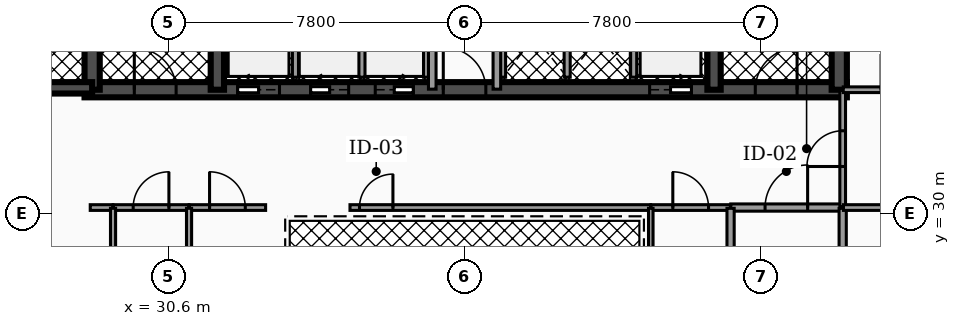
"""IFC4 building model, lengths in metres.
Left out: names, types, materials, properties, quantities, classifications, styles, units other than length and angle.
Written with IfcOpenShell. Run it as: python <this file> out.ifc"""

import sys

from ifc_helpers import new_model, si_unit, direction, frame, frame_2d, origin, place, context, subcontext, project, spatial, rectangle, extrude, element, fill, save


model = new_model("IFC4")
c1 = context("Model", 3, precision=1e-05, world=origin(), true_north=direction((0.0, 1.0)))
c2 = subcontext(c1, "Body", "Model", "MODEL_VIEW")
j1 = project(units=[si_unit("LENGTHUNIT", "METRE"), si_unit("PLANEANGLEUNIT", "RADIAN")], contexts=[c1])
p1 = place(None, origin())
s1 = spatial("IfcSite", under=j1, at=p1, CompositionType="ELEMENT")
p2 = place(p1, origin())
s2 = spatial("IfcBuilding", under=s1, at=p2, CompositionType="ELEMENT")
p3 = place(p2, frame((0.0, 0.0, 138.38)))
s3 = spatial("IfcBuildingStorey", under=s2, at=p3, CompositionType="ELEMENT", Elevation=138.38)
p4 = place(p3, frame((28.4, 33.25, 0.0), z_axis=(0.0, 0.0, 1.0), x_axis=(1.0, 0.0, 0.0)))
e1 = element("IfcWall", 1, at=p4, inside=s3, PredefinedType="SHEAR", context=c2, shape_type="SweptSolid", body=[
    extrude(rectangle(XDim=20.06, YDim=0.4, at=frame_2d((10.03, 0.0))), origin(), (0.0, 0.0, 1.0), 3.5),
])
p5 = place(p4, frame((4.03, 0.0, 0.0)))
e2 = element("IfcOpeningElement", 2, at=p5, cuts=e1, PredefinedType="OPENING", context=c2, shape_type="SweptSolid", body=[
    extrude(rectangle(XDim=1.1, YDim=2.15, at=frame_2d((0.55, 1.075))), frame((0.0, 0.21, 0.0), z_axis=(0.0, -1.0, 0.0), x_axis=(1.0, 0.0, 0.0)), (0.0, 0.0, 1.0), 0.42),
])
p6 = place(p4, frame((14.87, 0.0, 0.0)))
e3 = element("IfcOpeningElement", 3, at=p6, cuts=e1, PredefinedType="OPENING", context=c2, shape_type="SweptSolid", body=[
    extrude(rectangle(XDim=1.1, YDim=2.15, at=frame_2d((0.55, 1.075))), frame((0.0, 0.21, 0.0), z_axis=(0.0, -1.0, 0.0), x_axis=(1.0, 0.0, 0.0)), (0.0, 0.0, 1.0), 0.42),
])
p7 = place(p4, frame((5.95, 0.0, 0.0)))
e4 = element("IfcOpeningElement", 4, at=p7, cuts=e1, PredefinedType="OPENING", context=c2, shape_type="SweptSolid", body=[
    extrude(rectangle(XDim=1.0, YDim=2.1, at=frame_2d((0.5, 1.05))), frame((0.0, 0.21, 0.0), z_axis=(0.0, -1.0, 0.0), x_axis=(1.0, 0.0, 0.0)), (0.0, 0.0, 1.0), 0.42),
])
p8 = place(p4, frame((7.65, 0.0, 0.0)))
e5 = element("IfcOpeningElement", 5, at=p8, cuts=e1, PredefinedType="OPENING", context=c2, shape_type="SweptSolid", body=[
    extrude(rectangle(XDim=1.0, YDim=2.1, at=frame_2d((0.5, 1.05))), frame((0.0, 0.21, 0.0), z_axis=(0.0, -1.0, 0.0), x_axis=(1.0, 0.0, 0.0)), (0.0, 0.0, 1.0), 0.42),
])
p9 = place(p4, frame((1.31, 0.0, 0.0)))
e6 = element("IfcOpeningElement", 6, at=p9, cuts=e1, PredefinedType="OPENING", context=c2, shape_type="SweptSolid", body=[
    extrude(rectangle(XDim=1.1, YDim=2.2, at=frame_2d((0.55, 1.1))), frame((0.0, 0.21, 0.0), z_axis=(0.0, -1.0, 0.0), x_axis=(1.0, 0.0, 0.0)), (0.0, 0.0, 1.0), 0.42),
])
p10 = place(p4, frame((9.44, 0.0, 0.0)))
e7 = element("IfcOpeningElement", 7, at=p10, cuts=e1, PredefinedType="OPENING", context=c2, shape_type="SweptSolid", body=[
    extrude(rectangle(XDim=1.12, YDim=2.05, at=frame_2d((0.56, 1.025))), frame((0.0, 0.21, 0.0), z_axis=(0.0, -1.0, 0.0), x_axis=(1.0, 0.0, 0.0)), (0.0, 0.0, 1.0), 0.42),
])
p11 = place(p4, frame((17.65, 0.0, 0.0)))
e8 = element("IfcOpeningElement", 8, at=p11, cuts=e1, PredefinedType="OPENING", context=c2, shape_type="SweptSolid", body=[
    extrude(rectangle(XDim=1.1, YDim=2.2, at=frame_2d((0.55, 1.1))), frame((0.0, 0.21, 0.0), z_axis=(0.0, -1.0, 0.0), x_axis=(1.0, 0.0, 0.0)), (0.0, 0.0, 1.0), 0.42),
])
p12 = place(p3, frame((28.6, 33.25, 0.0), z_axis=(0.0, 0.0, 1.0), x_axis=(0.0, 1.0, 0.0)))
e9 = element("IfcWall", 9, at=p12, inside=s3, PredefinedType="SHEAR", context=c2, shape_type="SweptSolid", body=[
    extrude(rectangle(XDim=10.2, YDim=0.4, at=frame_2d((5.1, 0.0))), origin(), (0.0, 0.0, 1.0), 3.5),
])
for number, where, z_axis, x_axis in (
    (10, (31.895, 33.25, 0.0), (0.0, 0.0, 1.0), (0.0, 1.0, 0.0)),
    (11, (44.965, 33.25, 0.0), (0.0, 0.0, 1.0), (0.0, 1.0, 0.0)),
):
    element("IfcWall", number, at=place(p3, frame(where, z_axis=z_axis, x_axis=x_axis)), inside=s3, PredefinedType="SHEAR", context=c2, shape_type="SweptSolid", body=[
        extrude(rectangle(XDim=10.2, YDim=0.35, at=frame_2d((5.1, 0.0))), origin(), (0.0, 0.0, 1.0), 3.5),
    ])
p13 = place(p3, frame((48.26, 33.25, 0.0), z_axis=(0.0, 0.0, 1.0), x_axis=(0.0, 1.0, 0.0)))
e12 = element("IfcWall", 12, at=p13, inside=s3, PredefinedType="SHEAR", context=c2, shape_type="SweptSolid", body=[
    extrude(rectangle(XDim=10.2, YDim=0.4, at=frame_2d((5.1, 0.0))), origin(), (0.0, 0.0, 1.0), 3.5),
])
p14 = place(p3, frame((25.08, 33.3, 0.0), z_axis=(0.0, 0.0, 1.0), x_axis=(1.0, 0.0, 0.0)))
e13 = element("IfcWall", 13, at=p14, inside=s3, PredefinedType="SHEAR", context=c2, shape_type="SweptSolid", body=[
    extrude(rectangle(XDim=3.52, YDim=0.3, at=frame_2d((1.76, 0.0))), origin(), (0.0, 0.0, 1.0), 3.5),
])
p15 = place(p14, frame((1.335, 0.0, 0.0)))
e14 = element("IfcOpeningElement", 14, at=p15, cuts=e13, PredefinedType="OPENING", context=c2, shape_type="SweptSolid", body=[
    extrude(rectangle(XDim=0.95, YDim=2.2, at=frame_2d((0.475, 1.1))), frame((0.0, 0.16, 0.0), z_axis=(0.0, -1.0, 0.0), x_axis=(1.0, 0.0, 0.0)), (0.0, 0.0, 1.0), 0.32),
])
for number, where, z_axis, x_axis in (
    (15, (33.95, 33.58, 0.0), (0.0, 0.0, 1.0), (0.0, 1.0, 0.0)),
    (16, (42.85, 33.58, 0.0), (0.0, 0.0, 1.0), (0.0, 1.0, 0.0)),
):
    element("IfcWall", number, at=place(p3, frame(where, z_axis=z_axis, x_axis=x_axis)), inside=s3, PredefinedType="SOLIDWALL", context=c2, shape_type="SweptSolid", body=[
        extrude(rectangle(XDim=2.45, YDim=0.16, at=frame_2d((1.225, 0.0))), origin(), (0.0, 0.0, 1.0), 2.472),
    ])
for number, where, z_axis, x_axis in (
    (17, (35.7, 33.58, 0.0), (0.0, 0.0, 1.0), (0.0, 1.0, 0.0)),
    (18, (37.4, 33.58, 0.0), (0.0, 0.0, 1.0), (0.0, 1.0, 0.0)),
    (19, (39.4, 33.58, 0.0), (0.0, 0.0, 1.0), (0.0, 1.0, 0.0)),
    (20, (41.1, 33.58, 0.0), (0.0, 0.0, 1.0), (0.0, 1.0, 0.0)),
):
    element("IfcWall", number, at=place(p3, frame(where, z_axis=z_axis, x_axis=x_axis)), inside=s3, PredefinedType="SOLIDWALL", context=c2, shape_type="SweptSolid", body=[
        extrude(rectangle(XDim=2.25, YDim=0.16, at=frame_2d((1.125, 0.0))), origin(), (0.0, 0.0, 1.0), 2.472),
    ])
p16 = place(p3, frame((37.55, 33.265, 0.0), z_axis=(0.0, 0.0, 1.0), x_axis=(0.0, 1.0, 0.0)))
e21 = element("IfcWall", 21, at=p16, inside=s3, PredefinedType="PARTITIONING", context=c2, shape_type="SweptSolid", body=[
    extrude(rectangle(XDim=4.595, YDim=0.2, at=frame_2d((2.298, 0.0))), origin(), (0.0, 0.0, 1.0), 2.457),
])
p17 = place(p16, frame((3.058, 0.0, 0.0)))
e22 = element("IfcOpeningElement", 22, at=p17, cuts=e21, PredefinedType="OPENING", context=c2, shape_type="SweptSolid", body=[
    extrude(rectangle(XDim=0.88, YDim=2.05, at=frame_2d((0.44, 1.025))), frame((0.0, 0.11, 0.0), z_axis=(0.0, -1.0, 0.0), x_axis=(1.0, 0.0, 0.0)), (0.0, 0.0, 1.0), 0.22),
])
p18 = place(p3, frame((39.25, 33.265, 0.0), z_axis=(0.0, 0.0, 1.0), x_axis=(0.0, 1.0, 0.0)))
e23 = element("IfcWall", 23, at=p18, inside=s3, PredefinedType="PARTITIONING", context=c2, shape_type="SweptSolid", body=[
    extrude(rectangle(XDim=4.595, YDim=0.2, at=frame_2d((2.298, 0.0))), origin(), (0.0, 0.0, 1.0), 2.457),
])
p19 = place(p18, frame((3.058, 0.0, 0.0)))
e24 = element("IfcOpeningElement", 24, at=p19, cuts=e23, PredefinedType="OPENING", context=c2, shape_type="SweptSolid", body=[
    extrude(rectangle(XDim=0.88, YDim=2.05, at=frame_2d((0.44, 1.025))), frame((0.0, 0.11, 0.0), z_axis=(0.0, -1.0, 0.0), x_axis=(1.0, 0.0, 0.0)), (0.0, 0.0, 1.0), 0.22),
])
p20 = place(p3, frame((45.405, 30.15, 0.0), z_axis=(0.0, 0.0, 1.0), x_axis=(1.0, 0.0, 0.0)))
e25 = element("IfcWall", 25, at=p20, inside=s3, PredefinedType="PARTITIONING", context=c2, shape_type="SweptSolid", body=[
    extrude(rectangle(XDim=2.925, YDim=0.19, at=frame_2d((1.462, 0.0))), origin(), (0.0, 0.0, 1.0), 2.457),
])
p21 = place(p20, frame((0.903, 0.0, 0.0)))
e26 = element("IfcOpeningElement", 26, at=p21, cuts=e25, PredefinedType="OPENING", context=c2, shape_type="SweptSolid", body=[
    extrude(rectangle(XDim=1.12, YDim=2.05, at=frame_2d((0.56, 1.025))), frame((0.0, 0.105, 0.0), z_axis=(0.0, -1.0, 0.0), x_axis=(1.0, 0.0, 0.0)), (0.0, 0.0, 1.0), 0.21),
])
p22 = place(p3, frame((48.35, 30.17, 0.0), z_axis=(0.0, 0.0, 1.0), x_axis=(0.0, 1.0, 0.0)))
e27 = element("IfcWall", 27, at=p22, inside=s3, PredefinedType="PARTITIONING", context=c2, shape_type="SweptSolid", body=[
    extrude(rectangle(XDim=3.06, YDim=0.15, at=frame_2d((1.53, 0.0))), origin(), (0.0, 0.0, 1.0), 2.457),
])
p23 = place(p22, frame((1.06, 0.0, 0.0)))
e28 = element("IfcOpeningElement", 28, at=p23, cuts=e27, PredefinedType="OPENING", context=c2, shape_type="SweptSolid", body=[
    extrude(rectangle(XDim=0.94, YDim=2.05, at=frame_2d((0.47, 1.025))), frame((0.0, 0.085, 0.0), z_axis=(0.0, -1.0, 0.0), x_axis=(1.0, 0.0, 0.0)), (0.0, 0.0, 1.0), 0.17),
])
p24 = place(p3, frame((28.55, 30.15, 0.0), z_axis=(0.0, 0.0, 1.0), x_axis=(1.0, 0.0, 0.0)))
e29 = element("IfcWall", 29, at=p24, inside=s3, PredefinedType="PARTITIONING", context=c2, shape_type="SweptSolid", body=[
    extrude(rectangle(XDim=0.595, YDim=0.15, at=frame_2d((0.297, 0.0))), origin(), (0.0, 0.0, 1.0), 2.457),
])
p25 = place(p3, frame((29.155, 30.15, 0.0), z_axis=(0.0, 0.0, 1.0), x_axis=(1.0, 0.0, 0.0)))
e30 = element("IfcWall", 30, at=p25, inside=s3, PredefinedType="PARTITIONING", context=c2, shape_type="SweptSolid", body=[
    extrude(rectangle(XDim=1.99, YDim=0.15, at=frame_2d((0.995, 0.0))), origin(), (0.0, 0.0, 1.0), 2.457),
])
p26 = place(p25, frame((0.525, 0.0, 0.0)))
e31 = element("IfcOpeningElement", 31, at=p26, cuts=e30, PredefinedType="OPENING", context=c2, shape_type="SweptSolid", body=[
    extrude(rectangle(XDim=0.94, YDim=2.05, at=frame_2d((0.47, 1.025))), frame((0.0, 0.085, 0.0), z_axis=(0.0, -1.0, 0.0), x_axis=(1.0, 0.0, 0.0)), (0.0, 0.0, 1.0), 0.17),
])
p27 = place(p3, frame((31.155, 30.15, 0.0), z_axis=(0.0, 0.0, 1.0), x_axis=(1.0, 0.0, 0.0)))
e32 = element("IfcWall", 32, at=p27, inside=s3, PredefinedType="PARTITIONING", context=c2, shape_type="SweptSolid", body=[
    extrude(rectangle(XDim=2.01, YDim=0.15, at=frame_2d((1.005, 0.0))), origin(), (0.0, 0.0, 1.0), 2.457),
])
p28 = place(p27, frame((0.535, 0.0, 0.0)))
e33 = element("IfcOpeningElement", 33, at=p28, cuts=e32, PredefinedType="OPENING", context=c2, shape_type="SweptSolid", body=[
    extrude(rectangle(XDim=0.94, YDim=2.05, at=frame_2d((0.47, 1.025))), frame((0.0, 0.085, 0.0), z_axis=(0.0, -1.0, 0.0), x_axis=(1.0, 0.0, 0.0)), (0.0, 0.0, 1.0), 0.17),
])
p29 = place(p3, frame((35.385, 30.15, 0.0), z_axis=(0.0, 0.0, 1.0), x_axis=(1.0, 0.0, 0.0)))
e34 = element("IfcWall", 34, at=p29, inside=s3, PredefinedType="PARTITIONING", context=c2, shape_type="SweptSolid", body=[
    extrude(rectangle(XDim=7.91, YDim=0.15, at=frame_2d((3.955, 0.0))), origin(), (0.0, 0.0, 1.0), 2.457),
])
p30 = place(p29, frame((0.25, 0.0, 0.0)))
e35 = element("IfcOpeningElement", 35, at=p30, cuts=e34, PredefinedType="OPENING", context=c2, shape_type="SweptSolid", body=[
    extrude(rectangle(XDim=0.88, YDim=2.05, at=frame_2d((0.44, 1.025))), frame((0.0, 0.085, 0.0), z_axis=(0.0, -1.0, 0.0), x_axis=(1.0, 0.0, 0.0)), (0.0, 0.0, 1.0), 0.17),
])
p31 = place(p3, frame((43.305, 30.15, 0.0), z_axis=(0.0, 0.0, 1.0), x_axis=(1.0, 0.0, 0.0)))
e36 = element("IfcWall", 36, at=p31, inside=s3, PredefinedType="PARTITIONING", context=c2, shape_type="SweptSolid", body=[
    extrude(rectangle(XDim=2.09, YDim=0.15, at=frame_2d((1.045, 0.0))), origin(), (0.0, 0.0, 1.0), 2.457),
])
p32 = place(p31, frame((0.575, 0.0, 0.0)))
e37 = element("IfcOpeningElement", 37, at=p32, cuts=e36, PredefinedType="OPENING", context=c2, shape_type="SweptSolid", body=[
    extrude(rectangle(XDim=0.94, YDim=2.05, at=frame_2d((0.47, 1.025))), frame((0.0, 0.085, 0.0), z_axis=(0.0, -1.0, 0.0), x_axis=(1.0, 0.0, 0.0)), (0.0, 0.0, 1.0), 0.17),
])
for number, where, z_axis, x_axis in (
    (38, (45.4, 27.37, 0.0), (0.0, 0.0, 1.0), (0.0, 1.0, 0.0)),
    (39, (48.35, 27.37, 0.0), (0.0, 0.0, 1.0), (0.0, 1.0, 0.0)),
):
    element("IfcWall", number, at=place(p3, frame(where, z_axis=z_axis, x_axis=x_axis)), inside=s3, PredefinedType="PARTITIONING", context=c2, shape_type="SweptSolid", body=[
        extrude(rectangle(XDim=2.76, YDim=0.19, at=frame_2d((1.38, 0.0))), origin(), (0.0, 0.0, 1.0), 2.457),
    ])
p33 = place(p3, frame((48.37, 30.15, 0.0), z_axis=(0.0, 0.0, 1.0), x_axis=(1.0, 0.0, 0.0)))
e40 = element("IfcWall", 40, at=p33, inside=s3, PredefinedType="PARTITIONING", context=c2, shape_type="SweptSolid", body=[
    extrude(rectangle(XDim=1.309, YDim=0.15, at=frame_2d((0.654, 0.0))), origin(), (0.0, 0.0, 1.0), 2.457),
])
p34 = place(p3, frame((48.365, 33.25, 0.0), z_axis=(0.0, 0.0, 1.0), x_axis=(1.0, 0.0, 0.0)))
e41 = element("IfcWall", 41, at=p34, inside=s3, PredefinedType="PARTITIONING", context=c2, shape_type="SweptSolid", body=[
    extrude(rectangle(XDim=2.93, YDim=0.15, at=frame_2d((1.465, 0.0))), origin(), (0.0, 0.0, 1.0), 2.457),
])
p35 = place(p34, frame((0.995, 0.0, 0.0)))
e42 = element("IfcOpeningElement", 42, at=p35, cuts=e41, PredefinedType="OPENING", context=c2, shape_type="SweptSolid", body=[
    extrude(rectangle(XDim=0.94, YDim=2.05, at=frame_2d((0.47, 1.025))), frame((0.0, 0.085, 0.0), z_axis=(0.0, -1.0, 0.0), x_axis=(1.0, 0.0, 0.0)), (0.0, 0.0, 1.0), 0.17),
])
p36 = place(p3, frame((29.15, 27.17, 0.0), z_axis=(0.0, 0.0, 1.0), x_axis=(0.0, 1.0, 0.0)))
e43 = element("IfcWall", 43, at=p36, inside=s3, PredefinedType="PARTITIONING", context=c2, shape_type="SweptSolid", body=[
    extrude(rectangle(XDim=2.96, YDim=0.135, at=frame_2d((1.48, 0.0))), origin(), (0.0, 0.0, 1.0), 2.457),
])
p37 = place(p36, frame((1.05, 0.0, 0.0)))
e44 = element("IfcOpeningElement", 44, at=p37, cuts=e43, PredefinedType="OPENING", context=c2, shape_type="SweptSolid", body=[
    extrude(rectangle(XDim=0.86, YDim=2.05, at=frame_2d((0.43, 1.025))), frame((0.0, 0.077, 0.0), z_axis=(0.0, -1.0, 0.0), x_axis=(1.0, 0.0, 0.0)), (0.0, 0.0, 1.0), 0.155),
])
p38 = place(p3, frame((31.15, 27.17, 0.0), z_axis=(0.0, 0.0, 1.0), x_axis=(0.0, 1.0, 0.0)))
e45 = element("IfcWall", 45, at=p38, inside=s3, PredefinedType="PARTITIONING", context=c2, shape_type="SweptSolid", body=[
    extrude(rectangle(XDim=2.96, YDim=0.135, at=frame_2d((1.48, 0.0))), origin(), (0.0, 0.0, 1.0), 2.457),
])
p39 = place(p3, frame((43.3, 24.078, 0.0), z_axis=(0.0, 0.0, 1.0), x_axis=(0.0, 1.0, 0.0)))
e46 = element("IfcWall", 46, at=p39, inside=s3, PredefinedType="PARTITIONING", context=c2, shape_type="SweptSolid", body=[
    extrude(rectangle(XDim=6.052, YDim=0.12, at=frame_2d((3.026, 0.0))), origin(), (0.0, 0.0, 1.0), 2.457),
])
p40 = place(p5, origin())
e47 = element("IfcDoor", 47, at=p40, inside=s3, OperationType="SLIDING_TO_LEFT", PredefinedType="DOOR", context=c2, shape_type="SweptSolid", body=[
    extrude(rectangle(XDim=1.1, YDim=2.15, at=frame_2d((0.55, 1.075))), frame((0.0, 0.025, 0.0), z_axis=(0.0, -1.0, 0.0), x_axis=(1.0, 0.0, 0.0)), (0.0, 0.0, 1.0), 0.05),
])
fill(e2, e47)
p41 = place(p6, origin())
e48 = element("IfcDoor", 48, at=p41, inside=s3, OperationType="SLIDING_TO_RIGHT", PredefinedType="DOOR", context=c2, shape_type="SweptSolid", body=[
    extrude(rectangle(XDim=1.1, YDim=2.15, at=frame_2d((0.55, 1.075))), frame((0.0, 0.025, 0.0), z_axis=(0.0, -1.0, 0.0), x_axis=(1.0, 0.0, 0.0)), (0.0, 0.0, 1.0), 0.05),
])
fill(e3, e48)
p42 = place(p7, origin())
e49 = element("IfcDoor", 49, at=p42, inside=s3, OperationType="SLIDING_TO_LEFT", PredefinedType="DOOR", context=c2, shape_type="SweptSolid", body=[
    extrude(rectangle(XDim=1.0, YDim=2.1, at=frame_2d((0.5, 1.05))), frame((0.0, 0.025, 0.0), z_axis=(0.0, -1.0, 0.0), x_axis=(1.0, 0.0, 0.0)), (0.0, 0.0, 1.0), 0.05),
])
fill(e4, e49)
p43 = place(p8, origin())
e50 = element("IfcDoor", 50, at=p43, inside=s3, OperationType="SLIDING_TO_RIGHT", PredefinedType="DOOR", context=c2, shape_type="SweptSolid", body=[
    extrude(rectangle(XDim=1.0, YDim=2.1, at=frame_2d((0.5, 1.05))), frame((0.0, 0.025, 0.0), z_axis=(0.0, -1.0, 0.0), x_axis=(1.0, 0.0, 0.0)), (0.0, 0.0, 1.0), 0.05),
])
fill(e5, e50)
p44 = place(p9, origin())
e51 = element("IfcDoor", 51, at=p44, inside=s3, OperationType="SINGLE_SWING_LEFT", PredefinedType="DOOR", context=c2, shape_type="SweptSolid", body=[
    extrude(rectangle(XDim=1.1, YDim=2.2, at=frame_2d((0.55, 1.1))), frame((0.0, 0.025, 0.0), z_axis=(0.0, -1.0, 0.0), x_axis=(1.0, 0.0, 0.0)), (0.0, 0.0, 1.0), 0.05),
])
fill(e6, e51)
p45 = place(p10, origin())
e52 = element("IfcDoor", 52, at=p45, inside=s3, OperationType="SINGLE_SWING_LEFT", PredefinedType="DOOR", context=c2, shape_type="SweptSolid", body=[
    extrude(rectangle(XDim=1.12, YDim=2.05, at=frame_2d((0.56, 1.025))), frame((0.0, 0.025, 0.0), z_axis=(0.0, -1.0, 0.0), x_axis=(1.0, 0.0, 0.0)), (0.0, 0.0, 1.0), 0.05),
])
fill(e7, e52)
p46 = place(p11, origin())
e53 = element("IfcDoor", 53, at=p46, inside=s3, OperationType="SINGLE_SWING_RIGHT", PredefinedType="DOOR", context=c2, shape_type="SweptSolid", body=[
    extrude(rectangle(XDim=1.1, YDim=2.2, at=frame_2d((0.55, 1.1))), frame((0.0, 0.025, 0.0), z_axis=(0.0, -1.0, 0.0), x_axis=(1.0, 0.0, 0.0)), (0.0, 0.0, 1.0), 0.05),
])
fill(e8, e53)
p47 = place(p21, origin())
e54 = element("IfcDoor", 54, at=p47, inside=s3, OperationType="SINGLE_SWING_RIGHT", PredefinedType="DOOR", context=c2, shape_type="SweptSolid", body=[
    extrude(rectangle(XDim=1.12, YDim=2.05, at=frame_2d((0.56, 1.025))), frame((0.0, 0.025, 0.0), z_axis=(0.0, -1.0, 0.0), x_axis=(1.0, 0.0, 0.0)), (0.0, 0.0, 1.0), 0.05),
])
fill(e26, e54)
p48 = place(p23, origin())
e55 = element("IfcDoor", 55, at=p48, inside=s3, OperationType="SINGLE_SWING_LEFT", PredefinedType="DOOR", context=c2, shape_type="SweptSolid", body=[
    extrude(rectangle(XDim=0.94, YDim=2.05, at=frame_2d((0.47, 1.025))), frame((0.0, 0.025, 0.0), z_axis=(0.0, -1.0, 0.0), x_axis=(1.0, 0.0, 0.0)), (0.0, 0.0, 1.0), 0.05),
])
fill(e28, e55)
p49 = place(p26, origin())
e56 = element("IfcDoor", 56, at=p49, inside=s3, OperationType="SINGLE_SWING_RIGHT", PredefinedType="DOOR", context=c2, shape_type="SweptSolid", body=[
    extrude(rectangle(XDim=0.94, YDim=2.05, at=frame_2d((0.47, 1.025))), frame((0.0, 0.025, 0.0), z_axis=(0.0, -1.0, 0.0), x_axis=(1.0, 0.0, 0.0)), (0.0, 0.0, 1.0), 0.05),
])
fill(e31, e56)
p50 = place(p28, origin())
e57 = element("IfcDoor", 57, at=p50, inside=s3, OperationType="SINGLE_SWING_LEFT", PredefinedType="DOOR", context=c2, shape_type="SweptSolid", body=[
    extrude(rectangle(XDim=0.94, YDim=2.05, at=frame_2d((0.47, 1.025))), frame((0.0, 0.025, 0.0), z_axis=(0.0, -1.0, 0.0), x_axis=(1.0, 0.0, 0.0)), (0.0, 0.0, 1.0), 0.05),
])
fill(e33, e57)
p51 = place(p30, origin())
e58 = element("IfcDoor", 58, at=p51, inside=s3, OperationType="SINGLE_SWING_RIGHT", PredefinedType="DOOR", context=c2, shape_type="SweptSolid", body=[
    extrude(rectangle(XDim=0.88, YDim=2.05, at=frame_2d((0.44, 1.025))), frame((0.0, 0.025, 0.0), z_axis=(0.0, -1.0, 0.0), x_axis=(1.0, 0.0, 0.0)), (0.0, 0.0, 1.0), 0.05),
])
fill(e35, e58)
p52 = place(p32, origin())
e59 = element("IfcDoor", 59, at=p52, inside=s3, OperationType="SINGLE_SWING_LEFT", PredefinedType="DOOR", context=c2, shape_type="SweptSolid", body=[
    extrude(rectangle(XDim=0.94, YDim=2.05, at=frame_2d((0.47, 1.025))), frame((0.0, 0.025, 0.0), z_axis=(0.0, -1.0, 0.0), x_axis=(1.0, 0.0, 0.0)), (0.0, 0.0, 1.0), 0.05),
])
fill(e37, e59)
save(model, sys.argv[1])
